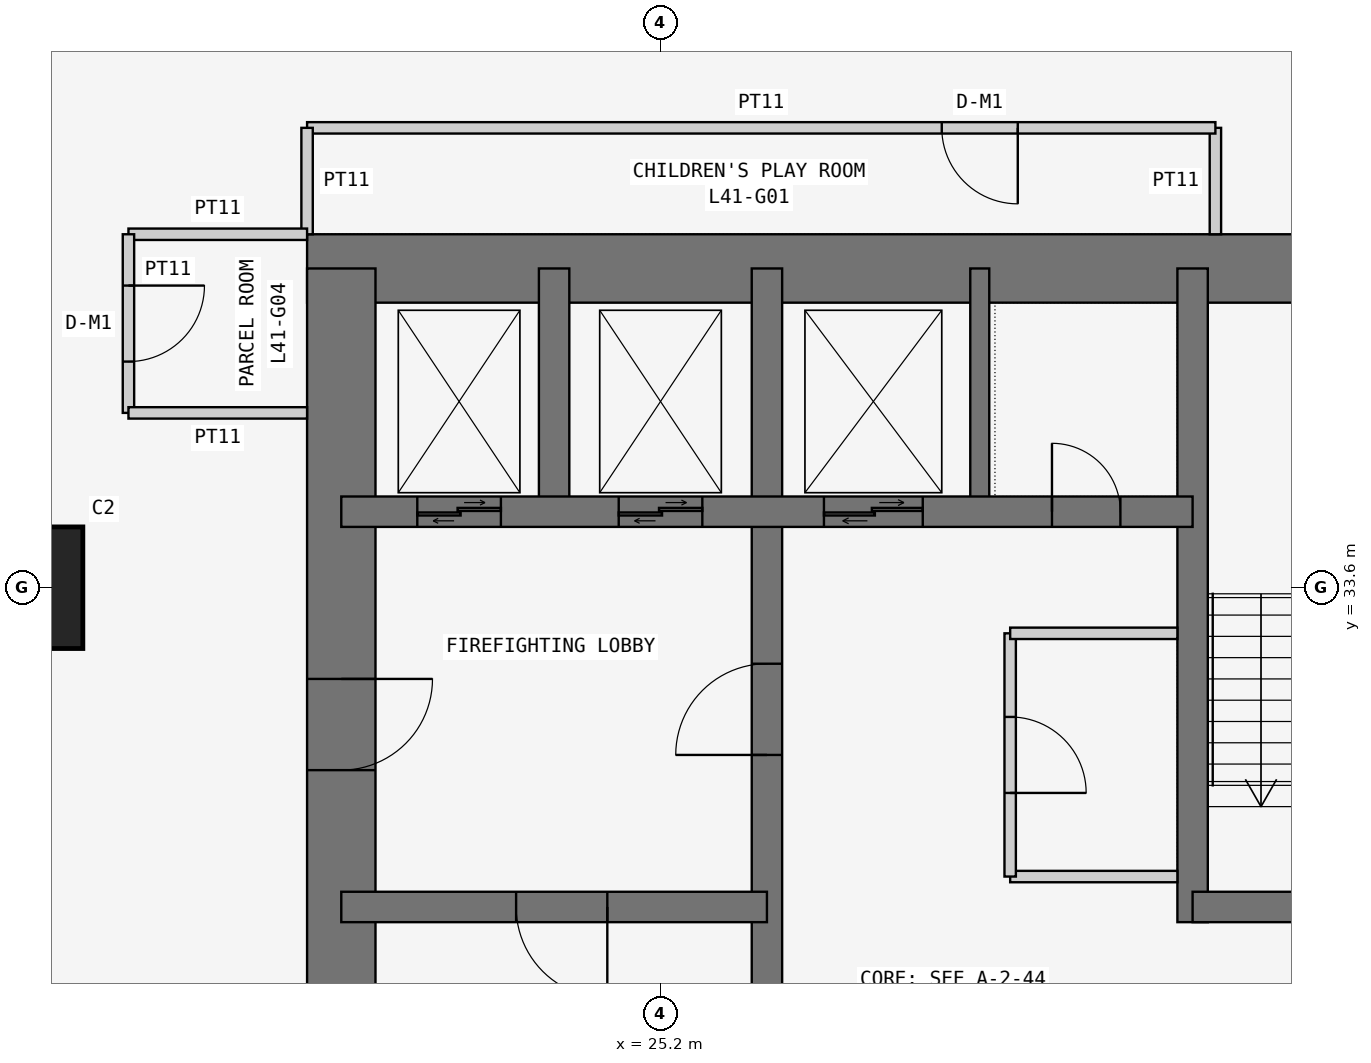
"""IFC4 building model, lengths in metres.
Left out: names, types, materials, properties, quantities, classifications, styles, units other than length and angle.
Written with IfcOpenShell. Run it as: python <this file> out.ifc"""

import sys

from ifc_helpers import new_model, si_unit, direction, frame, frame_2d, origin, origin_2d, place, context, subcontext, project, spatial, rectangle, extrude, element, fill, save


model = new_model("IFC4")
c1 = context("Model", 3, precision=1e-05, world=origin(), true_north=direction((0.0, 1.0)))
c2 = subcontext(c1, "Body", "Model", "MODEL_VIEW")
j1 = project(units=[si_unit("LENGTHUNIT", "METRE"), si_unit("PLANEANGLEUNIT", "RADIAN")], contexts=[c1])
p1 = place(None, origin())
s1 = spatial("IfcSite", under=j1, at=p1, CompositionType="ELEMENT")
p2 = place(p1, origin())
s2 = spatial("IfcBuilding", under=s1, at=p2, CompositionType="ELEMENT")
p3 = place(p2, frame((0.0, 0.0, 159.3)))
s3 = spatial("IfcBuildingStorey", under=s2, at=p3, CompositionType="ELEMENT", Elevation=159.3)
p4 = place(p3, frame((16.8, 33.6, 0.0), z_axis=(0.0, 0.0, 1.0), x_axis=(1.0, 0.0, 0.0)))
e1 = element("IfcColumn", 1, at=p4, inside=s3, PredefinedType="COLUMN", context=c2, shape_type="SweptSolid", body=[
    extrude(rectangle(XDim=1.6, YDim=1.6, at=origin_2d()), origin(), (0.0, 0.0, 1.0), 3.6),
])
p5 = place(p3, frame((37.8, 37.8, 0.0), z_axis=(0.0, 0.0, 1.0), x_axis=(-1.0, 0.0, 0.0)))
e2 = element("IfcWall", 2, at=p5, inside=s3, PredefinedType="SHEAR", context=c2, shape_type="SweptSolid", body=[
    extrude(rectangle(XDim=17.25, YDim=0.9, at=frame_2d((8.625, 0.0))), origin(), (0.0, 0.0, 1.0), 3.6),
])
p6 = place(p3, frame((21.0, 37.8, 0.0), z_axis=(0.0, 0.0, 1.0), x_axis=(0.0, -1.0, 0.0)))
e3 = element("IfcWall", 3, at=p6, inside=s3, PredefinedType="SHEAR", context=c2, shape_type="SweptSolid", body=[
    extrude(rectangle(XDim=17.25, YDim=0.9, at=frame_2d((8.625, 0.0))), origin(), (0.0, 0.0, 1.0), 3.6),
])
p7 = place(p6, frame((5.4, 0.0, 0.0)))
e4 = element("IfcOpeningElement", 4, at=p7, cuts=e3, PredefinedType="OPENING", context=c2, shape_type="SweptSolid", body=[
    extrude(rectangle(XDim=1.2, YDim=2.1, at=frame_2d((0.6, 1.05))), frame((0.0, 0.46, 0.0), z_axis=(0.0, -1.0, 0.0), x_axis=(1.0, 0.0, 0.0)), (0.0, 0.0, 1.0), 0.92),
])
p8 = place(p3, frame((26.6, 21.0, 0.0), z_axis=(0.0, 0.0, 1.0), x_axis=(0.0, 1.0, 0.0)))
e5 = element("IfcWall", 5, at=p8, inside=s3, PredefinedType="SHEAR", context=c2, shape_type="SweptSolid", body=[
    extrude(rectangle(XDim=16.8, YDim=0.4, at=frame_2d((8.4, 0.0))), origin(), (0.0, 0.0, 1.0), 3.6),
])
p9 = place(p8, frame((10.4, 0.0, 0.0)))
e6 = element("IfcOpeningElement", 6, at=p9, cuts=e5, PredefinedType="OPENING", context=c2, shape_type="SweptSolid", body=[
    extrude(rectangle(XDim=1.2, YDim=2.1, at=frame_2d((0.6, 1.05))), frame((0.0, 0.21, 0.0), z_axis=(0.0, -1.0, 0.0), x_axis=(1.0, 0.0, 0.0)), (0.0, 0.0, 1.0), 0.42),
])
p10 = place(p3, frame((21.0, 29.4, 0.0), z_axis=(0.0, 0.0, 1.0), x_axis=(1.0, 0.0, 0.0)))
e7 = element("IfcWall", 7, at=p10, inside=s3, PredefinedType="SHEAR", context=c2, shape_type="SweptSolid", body=[
    extrude(rectangle(XDim=5.6, YDim=0.4, at=frame_2d((2.8, 0.0))), origin(), (0.0, 0.0, 1.0), 3.6),
])
p11 = place(p10, frame((2.3, 0.0, 0.0)))
e8 = element("IfcOpeningElement", 8, at=p11, cuts=e7, PredefinedType="OPENING", context=c2, shape_type="SweptSolid", body=[
    extrude(rectangle(XDim=1.2, YDim=2.1, at=frame_2d((0.6, 1.05))), frame((0.0, 0.21, 0.0), z_axis=(0.0, -1.0, 0.0), x_axis=(1.0, 0.0, 0.0)), (0.0, 0.0, 1.0), 0.42),
])
p12 = place(p3, frame((21.0, 34.6, 0.0), z_axis=(0.0, 0.0, 1.0), x_axis=(1.0, 0.0, 0.0)))
e9 = element("IfcWall", 9, at=p12, inside=s3, PredefinedType="SHEAR", context=c2, shape_type="SweptSolid", body=[
    extrude(rectangle(XDim=11.2, YDim=0.4, at=frame_2d((5.6, 0.0))), origin(), (0.0, 0.0, 1.0), 3.6),
])
p13 = place(p12, frame((9.35, 0.0, 0.0)))
e10 = element("IfcOpeningElement", 10, at=p13, cuts=e9, PredefinedType="OPENING", context=c2, shape_type="SweptSolid", body=[
    extrude(rectangle(XDim=0.9, YDim=2.1, at=frame_2d((0.45, 1.05))), frame((0.0, 0.21, 0.0), z_axis=(0.0, -1.0, 0.0), x_axis=(1.0, 0.0, 0.0)), (0.0, 0.0, 1.0), 0.42),
])
p14 = place(p12, frame((1.0, 0.0, 0.0)))
e11 = element("IfcOpeningElement", 11, at=p14, cuts=e9, PredefinedType="OPENING", context=c2, shape_type="SweptSolid", body=[
    extrude(rectangle(XDim=1.1, YDim=2.1, at=frame_2d((0.55, 1.05))), frame((0.0, 0.21, 0.0), z_axis=(0.0, -1.0, 0.0), x_axis=(1.0, 0.0, 0.0)), (0.0, 0.0, 1.0), 0.42),
])
p15 = place(p12, frame((3.65, 0.0, 0.0)))
e12 = element("IfcOpeningElement", 12, at=p15, cuts=e9, PredefinedType="OPENING", context=c2, shape_type="SweptSolid", body=[
    extrude(rectangle(XDim=1.1, YDim=2.1, at=frame_2d((0.55, 1.05))), frame((0.0, 0.21, 0.0), z_axis=(0.0, -1.0, 0.0), x_axis=(1.0, 0.0, 0.0)), (0.0, 0.0, 1.0), 0.42),
])
p16 = place(p12, frame((6.35, 0.0, 0.0)))
e13 = element("IfcOpeningElement", 13, at=p16, cuts=e9, PredefinedType="OPENING", context=c2, shape_type="SweptSolid", body=[
    extrude(rectangle(XDim=1.3, YDim=2.1, at=frame_2d((0.65, 1.05))), frame((0.0, 0.21, 0.0), z_axis=(0.0, -1.0, 0.0), x_axis=(1.0, 0.0, 0.0)), (0.0, 0.0, 1.0), 0.42),
])
p17 = place(p3, frame((23.8, 34.6, 0.0), z_axis=(0.0, 0.0, 1.0), x_axis=(0.0, 1.0, 0.0)))
e14 = element("IfcWall", 14, at=p17, inside=s3, PredefinedType="SHEAR", context=c2, shape_type="SweptSolid", body=[
    extrude(rectangle(XDim=3.2, YDim=0.4, at=frame_2d((1.6, 0.0))), origin(), (0.0, 0.0, 1.0), 3.6),
])
p18 = place(p3, frame((32.2, 29.2, 0.0), z_axis=(0.0, 0.0, 1.0), x_axis=(0.0, 1.0, 0.0)))
e15 = element("IfcWall", 15, at=p18, inside=s3, PredefinedType="SHEAR", context=c2, shape_type="SweptSolid", body=[
    extrude(rectangle(XDim=8.6, YDim=0.4, at=frame_2d((4.3, 0.0))), origin(), (0.0, 0.0, 1.0), 3.6),
])
p19 = place(p3, frame((32.2, 29.4, 0.0), z_axis=(0.0, 0.0, 1.0), x_axis=(1.0, 0.0, 0.0)))
e16 = element("IfcWall", 16, at=p19, inside=s3, PredefinedType="SHEAR", context=c2, shape_type="SweptSolid", body=[
    extrude(rectangle(XDim=5.6, YDim=0.4, at=frame_2d((2.8, 0.0))), origin(), (0.0, 0.0, 1.0), 3.6),
])
p20 = place(p19, frame((2.0, 0.0, 0.0)))
e17 = element("IfcOpeningElement", 17, at=p20, cuts=e16, PredefinedType="OPENING", context=c2, shape_type="SweptSolid", body=[
    extrude(rectangle(XDim=1.2, YDim=2.1, at=frame_2d((0.6, 1.05))), frame((0.0, 0.21, 0.0), z_axis=(0.0, -1.0, 0.0), x_axis=(1.0, 0.0, 0.0)), (0.0, 0.0, 1.0), 0.42),
])
p21 = place(p3, frame((29.4, 34.6, 0.0), z_axis=(0.0, 0.0, 1.0), x_axis=(0.0, 1.0, 0.0)))
e18 = element("IfcWall", 18, at=p21, inside=s3, PredefinedType="SHEAR", context=c2, shape_type="SweptSolid", body=[
    extrude(rectangle(XDim=3.2, YDim=0.25, at=frame_2d((1.6, 0.0))), origin(), (0.0, 0.0, 1.0), 3.6),
])
p22 = place(p3, frame((32.5, 38.25, 0.0), z_axis=(0.0, 0.0, 1.0), x_axis=(0.0, 1.0, 0.0)))
e19 = element("IfcWall", 19, at=p22, inside=s3, PredefinedType="PARTITIONING", context=c2, shape_type="SweptSolid", body=[
    extrude(rectangle(XDim=1.4, YDim=0.15, at=frame_2d((0.7, 0.0))), origin(), (0.0, 0.0, 1.0), 3.45),
])
p23 = place(p3, frame((32.5, 39.65, 0.0), z_axis=(0.0, 0.0, 1.0), x_axis=(-1.0, 0.0, 0.0)))
e20 = element("IfcWall", 20, at=p23, inside=s3, PredefinedType="PARTITIONING", context=c2, shape_type="SweptSolid", body=[
    extrude(rectangle(XDim=11.95, YDim=0.15, at=frame_2d((5.975, 0.0))), origin(), (0.0, 0.0, 1.0), 3.45),
])
p24 = place(p23, frame((2.6, 0.0, 0.0)))
e21 = element("IfcOpeningElement", 21, at=p24, cuts=e20, PredefinedType="OPENING", context=c2, shape_type="SweptSolid", body=[
    extrude(rectangle(XDim=1.0, YDim=2.1, at=frame_2d((0.5, 1.05))), frame((0.0, 0.085, 0.0), z_axis=(0.0, -1.0, 0.0), x_axis=(1.0, 0.0, 0.0)), (0.0, 0.0, 1.0), 0.17),
])
p25 = place(p3, frame((20.55, 39.65, 0.0), z_axis=(0.0, 0.0, 1.0), x_axis=(0.0, -1.0, 0.0)))
e22 = element("IfcWall", 22, at=p25, inside=s3, PredefinedType="PARTITIONING", context=c2, shape_type="SweptSolid", body=[
    extrude(rectangle(XDim=1.4, YDim=0.15, at=frame_2d((0.7, 0.0))), origin(), (0.0, 0.0, 1.0), 3.45),
])
p26 = place(p3, frame((20.55, 38.25, 0.0), z_axis=(0.0, 0.0, 1.0), x_axis=(-1.0, 0.0, 0.0)))
e23 = element("IfcWall", 23, at=p26, inside=s3, PredefinedType="PARTITIONING", context=c2, shape_type="SweptSolid", body=[
    extrude(rectangle(XDim=2.35, YDim=0.15, at=frame_2d((1.175, 0.0))), origin(), (0.0, 0.0, 1.0), 3.45),
])
p27 = place(p3, frame((18.2, 38.25, 0.0), z_axis=(0.0, 0.0, 1.0), x_axis=(0.0, -1.0, 0.0)))
e24 = element("IfcWall", 24, at=p27, inside=s3, PredefinedType="PARTITIONING", context=c2, shape_type="SweptSolid", body=[
    extrude(rectangle(XDim=2.35, YDim=0.15, at=frame_2d((1.175, 0.0))), origin(), (0.0, 0.0, 1.0), 3.45),
])
p28 = place(p27, frame((0.675, 0.0, 0.0)))
e25 = element("IfcOpeningElement", 25, at=p28, cuts=e24, PredefinedType="OPENING", context=c2, shape_type="SweptSolid", body=[
    extrude(rectangle(XDim=1.0, YDim=2.1, at=frame_2d((0.5, 1.05))), frame((0.0, 0.085, 0.0), z_axis=(0.0, -1.0, 0.0), x_axis=(1.0, 0.0, 0.0)), (0.0, 0.0, 1.0), 0.17),
])
p29 = place(p3, frame((18.2, 35.9, 0.0), z_axis=(0.0, 0.0, 1.0), x_axis=(1.0, 0.0, 0.0)))
e26 = element("IfcWall", 26, at=p29, inside=s3, PredefinedType="PARTITIONING", context=c2, shape_type="SweptSolid", body=[
    extrude(rectangle(XDim=2.35, YDim=0.15, at=frame_2d((1.175, 0.0))), origin(), (0.0, 0.0, 1.0), 3.45),
])
p30 = place(p3, frame((32.0, 29.8, 0.0), z_axis=(0.0, 0.0, 1.0), x_axis=(-1.0, 0.0, 0.0)))
e27 = element("IfcWall", 27, at=p30, inside=s3, PredefinedType="PARTITIONING", context=c2, shape_type="SweptSolid", body=[
    extrude(rectangle(XDim=2.2, YDim=0.15, at=frame_2d((1.1, 0.0))), origin(), (0.0, 0.0, 1.0), 3.45),
])
p31 = place(p3, frame((29.8, 29.8, 0.0), z_axis=(0.0, 0.0, 1.0), x_axis=(0.0, 1.0, 0.0)))
e28 = element("IfcWall", 28, at=p31, inside=s3, PredefinedType="PARTITIONING", context=c2, shape_type="SweptSolid", body=[
    extrude(rectangle(XDim=3.2, YDim=0.15, at=frame_2d((1.6, 0.0))), origin(), (0.0, 0.0, 1.0), 3.45),
])
p32 = place(p31, frame((1.1, 0.0, 0.0)))
e29 = element("IfcOpeningElement", 29, at=p32, cuts=e28, PredefinedType="OPENING", context=c2, shape_type="SweptSolid", body=[
    extrude(rectangle(XDim=1.0, YDim=2.1, at=frame_2d((0.5, 1.05))), frame((0.0, 0.085, 0.0), z_axis=(0.0, -1.0, 0.0), x_axis=(1.0, 0.0, 0.0)), (0.0, 0.0, 1.0), 0.17),
])
p33 = place(p3, frame((29.8, 33.0, 0.0), z_axis=(0.0, 0.0, 1.0), x_axis=(1.0, 0.0, 0.0)))
e30 = element("IfcWall", 30, at=p33, inside=s3, PredefinedType="PARTITIONING", context=c2, shape_type="SweptSolid", body=[
    extrude(rectangle(XDim=2.2, YDim=0.15, at=frame_2d((1.1, 0.0))), origin(), (0.0, 0.0, 1.0), 3.45),
])
p34 = place(p24, origin())
e31 = element("IfcDoor", 31, at=p34, inside=s3, OperationType="SINGLE_SWING_LEFT", PredefinedType="DOOR", context=c2, shape_type="SweptSolid", body=[
    extrude(rectangle(XDim=1.0, YDim=2.1, at=frame_2d((0.5, 1.05))), frame((0.0, 0.025, 0.0), z_axis=(0.0, -1.0, 0.0), x_axis=(1.0, 0.0, 0.0)), (0.0, 0.0, 1.0), 0.05),
])
fill(e21, e31)
p35 = place(p28, origin())
e32 = element("IfcDoor", 32, at=p35, inside=s3, OperationType="SINGLE_SWING_LEFT", PredefinedType="DOOR", context=c2, shape_type="SweptSolid", body=[
    extrude(rectangle(XDim=1.0, YDim=2.1, at=frame_2d((0.5, 1.05))), frame((0.0, 0.025, 0.0), z_axis=(0.0, -1.0, 0.0), x_axis=(1.0, 0.0, 0.0)), (0.0, 0.0, 1.0), 0.05),
])
fill(e25, e32)
p36 = place(p7, origin())
e33 = element("IfcDoor", 33, at=p36, inside=s3, OperationType="SINGLE_SWING_LEFT", PredefinedType="DOOR", context=c2, shape_type="SweptSolid", body=[
    extrude(rectangle(XDim=1.2, YDim=2.1, at=frame_2d((0.6, 1.05))), frame((0.0, 0.025, 0.0), z_axis=(0.0, -1.0, 0.0), x_axis=(1.0, 0.0, 0.0)), (0.0, 0.0, 1.0), 0.05),
])
fill(e4, e33)
p37 = place(p11, frame((1.2, 0.0, 0.0), z_axis=(0.0, 0.0, 1.0), x_axis=(-1.0, 0.0, 0.0)))
e34 = element("IfcDoor", 34, at=p37, inside=s3, OperationType="SINGLE_SWING_LEFT", PredefinedType="DOOR", context=c2, shape_type="SweptSolid", body=[
    extrude(rectangle(XDim=1.2, YDim=2.1, at=frame_2d((0.6, 1.05))), frame((0.0, 0.025, 0.0), z_axis=(0.0, -1.0, 0.0), x_axis=(1.0, 0.0, 0.0)), (0.0, 0.0, 1.0), 0.05),
])
fill(e8, e34)
p38 = place(p9, origin())
e35 = element("IfcDoor", 35, at=p38, inside=s3, OperationType="SINGLE_SWING_LEFT", PredefinedType="DOOR", context=c2, shape_type="SweptSolid", body=[
    extrude(rectangle(XDim=1.2, YDim=2.1, at=frame_2d((0.6, 1.05))), frame((0.0, 0.025, 0.0), z_axis=(0.0, -1.0, 0.0), x_axis=(1.0, 0.0, 0.0)), (0.0, 0.0, 1.0), 0.05),
])
fill(e6, e35)
p39 = place(p13, origin())
e36 = element("IfcDoor", 36, at=p39, inside=s3, OperationType="SINGLE_SWING_LEFT", PredefinedType="DOOR", context=c2, shape_type="SweptSolid", body=[
    extrude(rectangle(XDim=0.9, YDim=2.1, at=frame_2d((0.45, 1.05))), frame((0.0, 0.025, 0.0), z_axis=(0.0, -1.0, 0.0), x_axis=(1.0, 0.0, 0.0)), (0.0, 0.0, 1.0), 0.05),
])
fill(e10, e36)
p40 = place(p32, frame((1.0, 0.0, 0.0), z_axis=(0.0, 0.0, 1.0), x_axis=(-1.0, 0.0, 0.0)))
e37 = element("IfcDoor", 37, at=p40, inside=s3, OperationType="SINGLE_SWING_RIGHT", PredefinedType="DOOR", context=c2, shape_type="SweptSolid", body=[
    extrude(rectangle(XDim=1.0, YDim=2.1, at=frame_2d((0.5, 1.05))), frame((0.0, 0.025, 0.0), z_axis=(0.0, -1.0, 0.0), x_axis=(1.0, 0.0, 0.0)), (0.0, 0.0, 1.0), 0.05),
])
fill(e29, e37)
p41 = place(p14, origin())
e38 = element("IfcDoor", 38, at=p41, inside=s3, OperationType="DOUBLE_DOOR_SLIDING", PredefinedType="DOOR", context=c2, shape_type="SweptSolid", body=[
    extrude(rectangle(XDim=1.1, YDim=2.1, at=frame_2d((0.55, 1.05))), frame((0.0, 0.025, 0.0), z_axis=(0.0, -1.0, 0.0), x_axis=(1.0, 0.0, 0.0)), (0.0, 0.0, 1.0), 0.05),
])
fill(e11, e38)
p42 = place(p15, origin())
e39 = element("IfcDoor", 39, at=p42, inside=s3, OperationType="DOUBLE_DOOR_SLIDING", PredefinedType="DOOR", context=c2, shape_type="SweptSolid", body=[
    extrude(rectangle(XDim=1.1, YDim=2.1, at=frame_2d((0.55, 1.05))), frame((0.0, 0.025, 0.0), z_axis=(0.0, -1.0, 0.0), x_axis=(1.0, 0.0, 0.0)), (0.0, 0.0, 1.0), 0.05),
])
fill(e12, e39)
p43 = place(p16, origin())
e40 = element("IfcDoor", 40, at=p43, inside=s3, OperationType="DOUBLE_DOOR_SLIDING", PredefinedType="DOOR", context=c2, shape_type="SweptSolid", body=[
    extrude(rectangle(XDim=1.3, YDim=2.1, at=frame_2d((0.65, 1.05))), frame((0.0, 0.025, 0.0), z_axis=(0.0, -1.0, 0.0), x_axis=(1.0, 0.0, 0.0)), (0.0, 0.0, 1.0), 0.05),
])
fill(e13, e40)
save(model, sys.argv[1])
